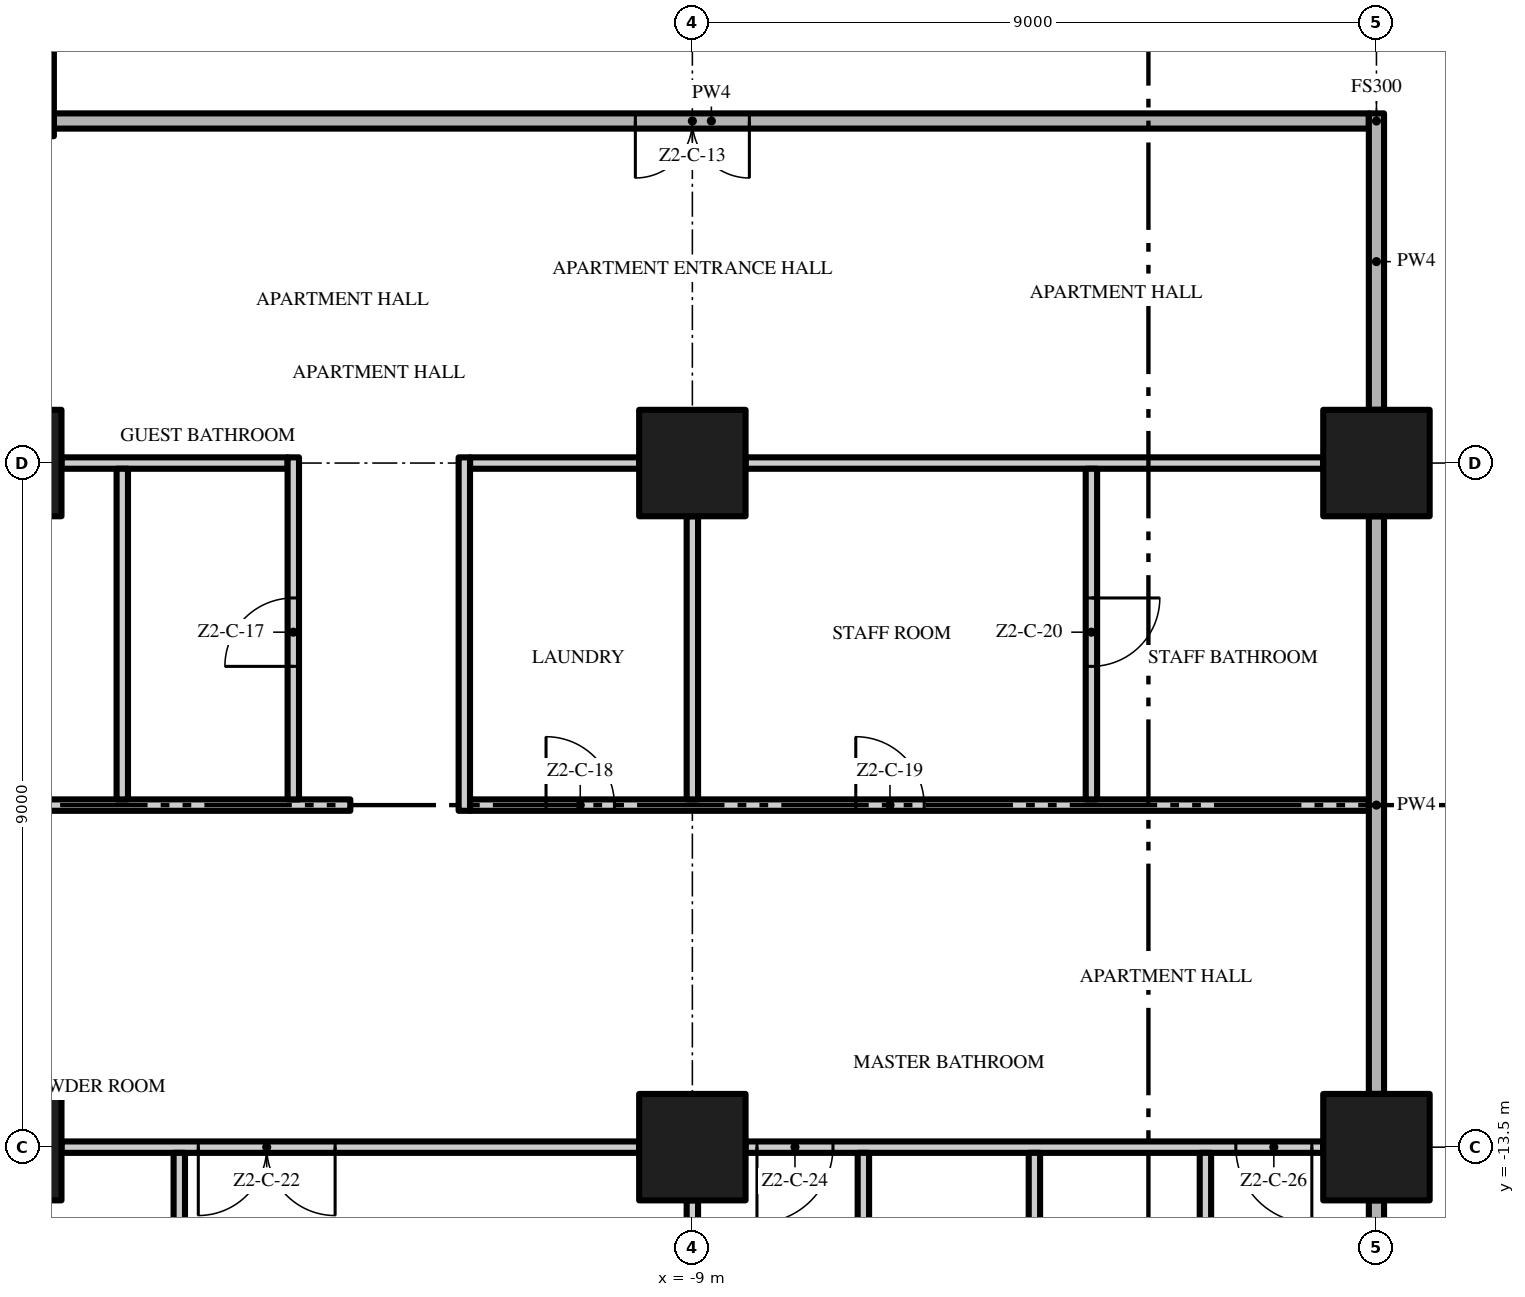
"""IFC4 building model, lengths in metres.
Left out: names, types, materials, properties, quantities, classifications, styles, units other than length and angle.
Written with IfcOpenShell. Run it as: python <this file> out.ifc"""

import sys

from ifc_helpers import new_model, si_unit, direction, frame, frame_2d, origin, origin_2d, place, context, subcontext, project, spatial, rectangle, extrude, element, fill, save


model = new_model("IFC4")
c1 = context("Model", 3, precision=1e-05, world=origin(), true_north=direction((0.0, 1.0)))
c2 = subcontext(c1, "Body", "Model", "MODEL_VIEW")
j1 = project(units=[si_unit("LENGTHUNIT", "METRE"), si_unit("PLANEANGLEUNIT", "RADIAN")], contexts=[c1])
p1 = place(None, origin())
s1 = spatial("IfcSite", under=j1, at=p1, CompositionType="ELEMENT")
p2 = place(p1, origin())
s2 = spatial("IfcBuilding", under=s1, at=p2, CompositionType="ELEMENT")
p3 = place(p2, frame((0.0, 0.0, 96.0)))
s3 = spatial("IfcBuildingStorey", under=s2, at=p3, CompositionType="ELEMENT", Elevation=96.0)
for number, where, z_axis, x_axis in (
    (1, (-18.0, -13.5, 0.0), (0.0, 0.0, 1.0), (1.0, 0.0, 0.0)),
    (2, (-18.0, -4.5, 0.0), (0.0, 0.0, 1.0), (1.0, 0.0, 0.0)),
    (3, (-9.0, -13.5, 0.0), (0.0, 0.0, 1.0), (1.0, 0.0, 0.0)),
    (4, (-9.0, -4.5, 0.0), (0.0, 0.0, 1.0), (1.0, 0.0, 0.0)),
    (5, (0.0, -13.5, 0.0), (0.0, 0.0, 1.0), (1.0, 0.0, 0.0)),
    (6, (0.0, -4.5, 0.0), (0.0, 0.0, 1.0), (1.0, 0.0, 0.0)),
):
    element("IfcColumn", number, at=place(p3, frame(where, z_axis=z_axis, x_axis=x_axis)), inside=s3, PredefinedType="COLUMN", context=c2, shape_type="SweptSolid", body=[
        extrude(rectangle(XDim=1.4, YDim=1.4, at=origin_2d()), origin(), (0.0, 0.0, 1.0), 3.5),
    ])
p4 = place(p3, frame((-9.7, -13.5, 0.0), z_axis=(0.0, 0.0, 1.0), x_axis=(-1.0, 0.0, 0.0)))
e7 = element("IfcWall", 7, at=p4, inside=s3, PredefinedType="PARTITIONING", context=c2, shape_type="SweptSolid", body=[
    extrude(rectangle(XDim=7.6, YDim=0.15, at=frame_2d((3.8, 0.0))), origin(), (0.0, 0.0, 1.0), 3.5),
])
p5 = place(p4, frame((4.0, 0.0, 0.0)))
e8 = element("IfcOpeningElement", 8, at=p5, cuts=e7, PredefinedType="OPENING", context=c2, shape_type="SweptSolid", body=[
    extrude(rectangle(XDim=1.8, YDim=2.4, at=frame_2d((0.9, 1.2))), frame((0.0, 0.085, 0.0), z_axis=(0.0, -1.0, 0.0), x_axis=(1.0, 0.0, 0.0)), (0.0, 0.0, 1.0), 0.17),
])
p6 = place(p3, frame((-0.7, -13.5, 0.0), z_axis=(0.0, 0.0, 1.0), x_axis=(-1.0, 0.0, 0.0)))
e9 = element("IfcWall", 9, at=p6, inside=s3, PredefinedType="PARTITIONING", context=c2, shape_type="SweptSolid", body=[
    extrude(rectangle(XDim=7.6, YDim=0.15, at=frame_2d((3.8, 0.0))), origin(), (0.0, 0.0, 1.0), 3.5),
])
p7 = place(p6, frame((6.45, 0.0, 0.0)))
e10 = element("IfcOpeningElement", 10, at=p7, cuts=e9, PredefinedType="OPENING", context=c2, shape_type="SweptSolid", body=[
    extrude(rectangle(XDim=1.0, YDim=2.4, at=frame_2d((0.5, 1.2))), frame((0.0, 0.085, 0.0), z_axis=(0.0, -1.0, 0.0), x_axis=(1.0, 0.0, 0.0)), (0.0, 0.0, 1.0), 0.17),
])
p8 = place(p6, frame((0.15, 0.0, 0.0)))
e11 = element("IfcOpeningElement", 11, at=p8, cuts=e9, PredefinedType="OPENING", context=c2, shape_type="SweptSolid", body=[
    extrude(rectangle(XDim=1.0, YDim=2.4, at=frame_2d((0.5, 1.2))), frame((0.0, 0.085, 0.0), z_axis=(0.0, -1.0, 0.0), x_axis=(1.0, 0.0, 0.0)), (0.0, 0.0, 1.0), 0.17),
])
p9 = place(p3, frame((-26.7, -9.0, 0.0), z_axis=(0.0, 0.0, 1.0), x_axis=(1.0, 0.0, 0.0)))
e12 = element("IfcWall", 12, at=p9, inside=s3, PredefinedType="PARTITIONING", context=c2, shape_type="SweptSolid", body=[
    extrude(rectangle(XDim=13.2, YDim=0.15, at=frame_2d((6.6, 0.0))), origin(), (0.0, 0.0, 1.0), 3.5),
])
p10 = place(p9, frame((0.2, 0.0, 0.0)))
e13 = element("IfcOpeningElement", 13, at=p10, cuts=e12, PredefinedType="OPENING", context=c2, shape_type="SweptSolid", body=[
    extrude(rectangle(XDim=0.8, YDim=2.0, at=frame_2d((0.4, 1.0))), frame((0.0, 0.085, 0.0), z_axis=(0.0, -1.0, 0.0), x_axis=(1.0, 0.0, 0.0)), (0.0, 0.0, 1.0), 0.17),
])
p11 = place(p3, frame((-11.925, -9.0, 0.0), z_axis=(0.0, 0.0, 1.0), x_axis=(1.0, 0.0, 0.0)))
e14 = element("IfcWall", 14, at=p11, inside=s3, PredefinedType="PARTITIONING", context=c2, shape_type="SweptSolid", body=[
    extrude(rectangle(XDim=11.825, YDim=0.15, at=frame_2d((5.912, 0.0))), origin(), (0.0, 0.0, 1.0), 3.5),
])
p12 = place(p11, frame((1.0, 0.0, 0.0)))
e15 = element("IfcOpeningElement", 15, at=p12, cuts=e14, PredefinedType="OPENING", context=c2, shape_type="SweptSolid", body=[
    extrude(rectangle(XDim=0.9, YDim=2.1, at=frame_2d((0.45, 1.05))), frame((0.0, 0.085, 0.0), z_axis=(0.0, -1.0, 0.0), x_axis=(1.0, 0.0, 0.0)), (0.0, 0.0, 1.0), 0.17),
])
p13 = place(p11, frame((5.075, 0.0, 0.0)))
e16 = element("IfcOpeningElement", 16, at=p13, cuts=e14, PredefinedType="OPENING", context=c2, shape_type="SweptSolid", body=[
    extrude(rectangle(XDim=0.9, YDim=2.1, at=frame_2d((0.45, 1.05))), frame((0.0, 0.085, 0.0), z_axis=(0.0, -1.0, 0.0), x_axis=(1.0, 0.0, 0.0)), (0.0, 0.0, 1.0), 0.17),
])
p14 = place(p3, frame((-17.3, -4.5, 0.0), z_axis=(0.0, 0.0, 1.0), x_axis=(1.0, 0.0, 0.0)))
e17 = element("IfcWall", 17, at=p14, inside=s3, PredefinedType="PARTITIONING", context=c2, shape_type="SweptSolid", body=[
    extrude(rectangle(XDim=2.975, YDim=0.15, at=frame_2d((1.488, 0.0))), origin(), (0.0, 0.0, 1.0), 3.5),
])
p15 = place(p3, frame((-11.925, -4.5, 0.0), z_axis=(0.0, 0.0, 1.0), x_axis=(1.0, 0.0, 0.0)))
e18 = element("IfcWall", 18, at=p15, inside=s3, PredefinedType="PARTITIONING", context=c2, shape_type="SweptSolid", body=[
    extrude(rectangle(XDim=2.225, YDim=0.15, at=frame_2d((1.113, 0.0))), origin(), (0.0, 0.0, 1.0), 3.5),
])
p16 = place(p3, frame((-8.3, -4.5, 0.0), z_axis=(0.0, 0.0, 1.0), x_axis=(1.0, 0.0, 0.0)))
e19 = element("IfcWall", 19, at=p16, inside=s3, PredefinedType="PARTITIONING", context=c2, shape_type="SweptSolid", body=[
    extrude(rectangle(XDim=7.6, YDim=0.15, at=frame_2d((3.8, 0.0))), origin(), (0.0, 0.0, 1.0), 3.5),
])
p17 = place(p3, frame((-0.1, 0.0, 0.0), z_axis=(0.0, 0.0, 1.0), x_axis=(-1.0, 0.0, 0.0)))
e20 = element("IfcWall", 20, at=p17, inside=s3, PredefinedType="PARTITIONING", context=c2, shape_type="SweptSolid", body=[
    extrude(rectangle(XDim=17.3, YDim=0.2, at=frame_2d((8.65, 0.0))), origin(), (0.0, 0.0, 1.0), 3.5),
])
p18 = place(p17, frame((8.15, 0.0, 0.0)))
e21 = element("IfcOpeningElement", 21, at=p18, cuts=e20, PredefinedType="OPENING", context=c2, shape_type="SweptSolid", body=[
    extrude(rectangle(XDim=1.5, YDim=2.4, at=frame_2d((0.75, 1.2))), frame((0.0, 0.11, 0.0), z_axis=(0.0, -1.0, 0.0), x_axis=(1.0, 0.0, 0.0)), (0.0, 0.0, 1.0), 0.22),
])
p19 = place(p3, frame((-17.5, -0.2, 0.0), z_axis=(0.0, 0.0, 1.0), x_axis=(0.0, 1.0, 0.0)))
e22 = element("IfcWall", 22, at=p19, inside=s3, PredefinedType="PARTITIONING", context=c2, shape_type="SweptSolid", body=[
    extrude(rectangle(XDim=4.0, YDim=0.2, at=frame_2d((2.0, 0.0))), origin(), (0.0, 0.0, 1.0), 3.5),
])
p20 = place(p3, frame((-16.5, -8.925, 0.0), z_axis=(0.0, 0.0, 1.0), x_axis=(0.0, 1.0, 0.0)))
e23 = element("IfcWall", 23, at=p20, inside=s3, PredefinedType="PARTITIONING", context=c2, shape_type="SweptSolid", body=[
    extrude(rectangle(XDim=4.35, YDim=0.15, at=frame_2d((2.175, 0.0))), origin(), (0.0, 0.0, 1.0), 3.5),
])
p21 = place(p3, frame((-15.75, -16.575, 0.0), z_axis=(0.0, 0.0, 1.0), x_axis=(0.0, 1.0, 0.0)))
e24 = element("IfcWall", 24, at=p21, inside=s3, PredefinedType="PARTITIONING", context=c2, shape_type="SweptSolid", body=[
    extrude(rectangle(XDim=3.0, YDim=0.15, at=frame_2d((1.5, 0.0))), origin(), (0.0, 0.0, 1.0), 3.5),
])
p22 = place(p3, frame((-14.25, -8.925, 0.0), z_axis=(0.0, 0.0, 1.0), x_axis=(0.0, 1.0, 0.0)))
e25 = element("IfcWall", 25, at=p22, inside=s3, PredefinedType="PARTITIONING", context=c2, shape_type="SweptSolid", body=[
    extrude(rectangle(XDim=4.5, YDim=0.15, at=frame_2d((2.25, 0.0))), origin(), (0.0, 0.0, 1.0), 3.5),
])
p23 = place(p22, frame((1.75, 0.0, 0.0)))
e26 = element("IfcOpeningElement", 26, at=p23, cuts=e25, PredefinedType="OPENING", context=c2, shape_type="SweptSolid", body=[
    extrude(rectangle(XDim=0.9, YDim=2.1, at=frame_2d((0.45, 1.05))), frame((0.0, 0.085, 0.0), z_axis=(0.0, -1.0, 0.0), x_axis=(1.0, 0.0, 0.0)), (0.0, 0.0, 1.0), 0.17),
])
p24 = place(p3, frame((-12.0, -9.075, 0.0), z_axis=(0.0, 0.0, 1.0), x_axis=(0.0, 1.0, 0.0)))
e27 = element("IfcWall", 27, at=p24, inside=s3, PredefinedType="PARTITIONING", context=c2, shape_type="SweptSolid", body=[
    extrude(rectangle(XDim=4.65, YDim=0.15, at=frame_2d((2.325, 0.0))), origin(), (0.0, 0.0, 1.0), 3.5),
])
p25 = place(p3, frame((-9.0, -21.2, 0.0), z_axis=(0.0, 0.0, 1.0), x_axis=(0.0, 1.0, 0.0)))
e28 = element("IfcWall", 28, at=p25, inside=s3, PredefinedType="PARTITIONING", context=c2, shape_type="SweptSolid", body=[
    extrude(rectangle(XDim=7.0, YDim=0.15, at=frame_2d((3.5, 0.0))), origin(), (0.0, 0.0, 1.0), 3.5),
])
p26 = place(p3, frame((-9.0, -8.925, 0.0), z_axis=(0.0, 0.0, 1.0), x_axis=(0.0, 1.0, 0.0)))
e29 = element("IfcWall", 29, at=p26, inside=s3, PredefinedType="PARTITIONING", context=c2, shape_type="SweptSolid", body=[
    extrude(rectangle(XDim=3.725, YDim=0.15, at=frame_2d((1.863, 0.0))), origin(), (0.0, 0.0, 1.0), 3.5),
])
p27 = place(p3, frame((-6.75, -16.575, 0.0), z_axis=(0.0, 0.0, 1.0), x_axis=(0.0, 1.0, 0.0)))
e30 = element("IfcWall", 30, at=p27, inside=s3, PredefinedType="PARTITIONING", context=c2, shape_type="SweptSolid", body=[
    extrude(rectangle(XDim=3.0, YDim=0.15, at=frame_2d((1.5, 0.0))), origin(), (0.0, 0.0, 1.0), 3.5),
])
p28 = place(p3, frame((-4.5, -22.2, 0.0), z_axis=(0.0, 0.0, 1.0), x_axis=(0.0, 1.0, 0.0)))
e31 = element("IfcWall", 31, at=p28, inside=s3, PredefinedType="PARTITIONING", context=c2, shape_type="SweptSolid", body=[
    extrude(rectangle(XDim=8.625, YDim=0.15, at=frame_2d((4.312, 0.0))), origin(), (0.0, 0.0, 1.0), 3.5),
])
p29 = place(p3, frame((-3.75, -4.575, 0.0), z_axis=(0.0, 0.0, 1.0), x_axis=(0.0, -1.0, 0.0)))
e32 = element("IfcWall", 32, at=p29, inside=s3, PredefinedType="PARTITIONING", context=c2, shape_type="SweptSolid", body=[
    extrude(rectangle(XDim=4.35, YDim=0.15, at=frame_2d((2.175, 0.0))), origin(), (0.0, 0.0, 1.0), 3.5),
])
p30 = place(p29, frame((1.7, 0.0, 0.0)))
e33 = element("IfcOpeningElement", 33, at=p30, cuts=e32, PredefinedType="OPENING", context=c2, shape_type="SweptSolid", body=[
    extrude(rectangle(XDim=0.9, YDim=2.1, at=frame_2d((0.45, 1.05))), frame((0.0, 0.085, 0.0), z_axis=(0.0, -1.0, 0.0), x_axis=(1.0, 0.0, 0.0)), (0.0, 0.0, 1.0), 0.17),
])
p31 = place(p3, frame((-2.25, -16.575, 0.0), z_axis=(0.0, 0.0, 1.0), x_axis=(0.0, 1.0, 0.0)))
e34 = element("IfcWall", 34, at=p31, inside=s3, PredefinedType="PARTITIONING", context=c2, shape_type="SweptSolid", body=[
    extrude(rectangle(XDim=3.0, YDim=0.15, at=frame_2d((1.5, 0.0))), origin(), (0.0, 0.0, 1.0), 3.5),
])
p32 = place(p3, frame((0.0, -21.2, 0.0), z_axis=(0.0, 0.0, 1.0), x_axis=(0.0, 1.0, 0.0)))
e35 = element("IfcWall", 35, at=p32, inside=s3, PredefinedType="PARTITIONING", context=c2, shape_type="SweptSolid", body=[
    extrude(rectangle(XDim=7.0, YDim=0.2, at=frame_2d((3.5, 0.0))), origin(), (0.0, 0.0, 1.0), 3.5),
])
p33 = place(p3, frame((0.0, -12.8, 0.0), z_axis=(0.0, 0.0, 1.0), x_axis=(0.0, 1.0, 0.0)))
e36 = element("IfcWall", 36, at=p33, inside=s3, PredefinedType="PARTITIONING", context=c2, shape_type="SweptSolid", body=[
    extrude(rectangle(XDim=7.6, YDim=0.2, at=frame_2d((3.8, 0.0))), origin(), (0.0, 0.0, 1.0), 3.5),
])
p34 = place(p3, frame((0.0, -3.8, 0.0), z_axis=(0.0, 0.0, 1.0), x_axis=(0.0, 1.0, 0.0)))
e37 = element("IfcWall", 37, at=p34, inside=s3, PredefinedType="PARTITIONING", context=c2, shape_type="SweptSolid", body=[
    extrude(rectangle(XDim=3.9, YDim=0.2, at=frame_2d((1.95, 0.0))), origin(), (0.0, 0.0, 1.0), 3.5),
])
p35 = place(p18, origin())
e38 = element("IfcDoor", 38, at=p35, inside=s3, OperationType="DOUBLE_DOOR_SINGLE_SWING", PredefinedType="DOOR", context=c2, shape_type="SweptSolid", body=[
    extrude(rectangle(XDim=1.5, YDim=2.4, at=frame_2d((0.75, 1.2))), frame((0.0, 0.025, 0.0), z_axis=(0.0, -1.0, 0.0), x_axis=(1.0, 0.0, 0.0)), (0.0, 0.0, 1.0), 0.05),
])
fill(e21, e38)
p36 = place(p23, origin())
e39 = element("IfcDoor", 39, at=p36, inside=s3, OperationType="SINGLE_SWING_LEFT", PredefinedType="DOOR", context=c2, shape_type="SweptSolid", body=[
    extrude(rectangle(XDim=0.9, YDim=2.1, at=frame_2d((0.45, 1.05))), frame((0.0, 0.025, 0.0), z_axis=(0.0, -1.0, 0.0), x_axis=(1.0, 0.0, 0.0)), (0.0, 0.0, 1.0), 0.05),
])
fill(e26, e39)
p37 = place(p12, origin())
e40 = element("IfcDoor", 40, at=p37, inside=s3, OperationType="SINGLE_SWING_LEFT", PredefinedType="DOOR", context=c2, shape_type="SweptSolid", body=[
    extrude(rectangle(XDim=0.9, YDim=2.1, at=frame_2d((0.45, 1.05))), frame((0.0, 0.025, 0.0), z_axis=(0.0, -1.0, 0.0), x_axis=(1.0, 0.0, 0.0)), (0.0, 0.0, 1.0), 0.05),
])
fill(e15, e40)
p38 = place(p13, origin())
e41 = element("IfcDoor", 41, at=p38, inside=s3, OperationType="SINGLE_SWING_LEFT", PredefinedType="DOOR", context=c2, shape_type="SweptSolid", body=[
    extrude(rectangle(XDim=0.9, YDim=2.1, at=frame_2d((0.45, 1.05))), frame((0.0, 0.025, 0.0), z_axis=(0.0, -1.0, 0.0), x_axis=(1.0, 0.0, 0.0)), (0.0, 0.0, 1.0), 0.05),
])
fill(e16, e41)
p39 = place(p30, origin())
e42 = element("IfcDoor", 42, at=p39, inside=s3, OperationType="SINGLE_SWING_LEFT", PredefinedType="DOOR", context=c2, shape_type="SweptSolid", body=[
    extrude(rectangle(XDim=0.9, YDim=2.1, at=frame_2d((0.45, 1.05))), frame((0.0, 0.025, 0.0), z_axis=(0.0, -1.0, 0.0), x_axis=(1.0, 0.0, 0.0)), (0.0, 0.0, 1.0), 0.05),
])
fill(e33, e42)
p40 = place(p5, origin())
e43 = element("IfcDoor", 43, at=p40, inside=s3, OperationType="DOUBLE_DOOR_SINGLE_SWING", PredefinedType="DOOR", context=c2, shape_type="SweptSolid", body=[
    extrude(rectangle(XDim=1.8, YDim=2.4, at=frame_2d((0.9, 1.2))), frame((0.0, 0.025, 0.0), z_axis=(0.0, -1.0, 0.0), x_axis=(1.0, 0.0, 0.0)), (0.0, 0.0, 1.0), 0.05),
])
fill(e8, e43)
p41 = place(p7, origin())
e44 = element("IfcDoor", 44, at=p41, inside=s3, OperationType="SINGLE_SWING_RIGHT", PredefinedType="DOOR", context=c2, shape_type="SweptSolid", body=[
    extrude(rectangle(XDim=1.0, YDim=2.4, at=frame_2d((0.5, 1.2))), frame((0.0, 0.025, 0.0), z_axis=(0.0, -1.0, 0.0), x_axis=(1.0, 0.0, 0.0)), (0.0, 0.0, 1.0), 0.05),
])
fill(e10, e44)
p42 = place(p8, origin())
e45 = element("IfcDoor", 45, at=p42, inside=s3, OperationType="SINGLE_SWING_LEFT", PredefinedType="DOOR", context=c2, shape_type="SweptSolid", body=[
    extrude(rectangle(XDim=1.0, YDim=2.4, at=frame_2d((0.5, 1.2))), frame((0.0, 0.025, 0.0), z_axis=(0.0, -1.0, 0.0), x_axis=(1.0, 0.0, 0.0)), (0.0, 0.0, 1.0), 0.05),
])
fill(e11, e45)
save(model, sys.argv[1])
